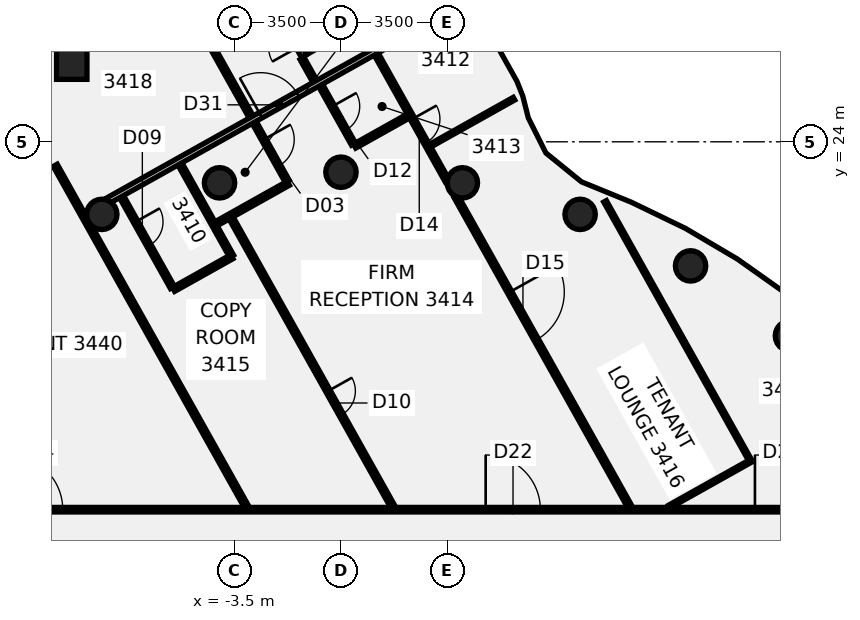
"""IFC4 building model, lengths in metres.
Left out: names, types, materials, properties, quantities, classifications, styles, units other than length and angle.
Written with IfcOpenShell. Run it as: python <this file> out.ifc"""

import sys

from ifc_helpers import new_model, si_unit, direction, frame, frame_2d, origin, origin_2d, place, context, subcontext, project, spatial, rectangle, circle, extrude, element, fill, save


model = new_model("IFC4")
c1 = context("Model", 3, precision=1e-05, world=origin(), true_north=direction((0.0, 1.0)))
c2 = subcontext(c1, "Body", "Model", "MODEL_VIEW")
j1 = project(units=[si_unit("LENGTHUNIT", "METRE"), si_unit("PLANEANGLEUNIT", "RADIAN")], contexts=[c1])
p1 = place(None, origin())
s1 = spatial("IfcSite", under=j1, at=p1, CompositionType="ELEMENT")
p2 = place(p1, origin())
s2 = spatial("IfcBuilding", under=s1, at=p2, CompositionType="ELEMENT")
p3 = place(p2, frame((0.0, 0.0, 140.5)))
s3 = spatial("IfcBuildingStorey", under=s2, at=p3, CompositionType="ELEMENT", Elevation=140.5)
for number, where, z_axis, x_axis in (
    (1, (14.784, 17.619, -0.14), (0.0, 0.0, 1.0), (1.0, 0.0, 0.0)),
    (2, (11.5, 19.919, -0.14), (0.0, 0.0, 1.0), (1.0, 0.0, 0.0)),
    (3, (7.866, 21.613, -0.14), (0.0, 0.0, 1.0), (1.0, 0.0, 0.0)),
    (4, (3.994, 22.651, -0.14), (0.0, 0.0, 1.0), (1.0, 0.0, 0.0)),
    (5, (0.0, 23.0, -0.14), (0.0, 0.0, 1.0), (1.0, 0.0, 0.0)),
    (6, (-3.994, 22.651, -0.14), (0.0, 0.0, 1.0), (1.0, 0.0, 0.0)),
    (7, (-7.866, 21.613, -0.14), (0.0, 0.0, 1.0), (1.0, 0.0, 0.0)),
):
    element("IfcColumn", number, at=place(p3, frame(where, z_axis=z_axis, x_axis=x_axis)), inside=s3, PredefinedType="COLUMN", context=c2, shape_type="SweptSolid", body=[
        extrude(circle(Radius=0.5, at=origin_2d()), origin(), (0.0, 0.0, 1.0), 3.75),
    ])
p4 = place(p3, frame((-8.855, 26.553, -0.139), z_axis=(-0.02173490651, -0.043209514738, 0.998829580897), x_axis=(0.872109852448, 0.487666364721, 0.040073956407)))
e8 = element("IfcColumn", 8, at=p4, inside=s3, PredefinedType="COLUMN", context=c2, shape_type="SweptSolid", body=[
    extrude(rectangle(XDim=1.0, YDim=1.0, at=origin_2d()), origin(), (0.0, 0.0, 1.0), 3.752),
])
p5 = place(p3, frame((-11.663, 40.368, 0.0), z_axis=(0.0, 0.0, 1.0), x_axis=(0.488668731848, -0.8724694095, 0.0)))
e9 = element("IfcWall", 9, at=p5, inside=s3, PredefinedType="PARTITIONING", context=c2, shape_type="SweptSolid", body=[
    extrude(rectangle(XDim=20.245, YDim=0.15, at=frame_2d((10.123, 0.0))), origin(), (0.0, 0.0, 1.0), 3.01),
])
p6 = place(p5, frame((18.675, 0.0, 0.0)))
e10 = element("IfcOpeningElement", 10, at=p6, cuts=e9, PredefinedType="OPENING", context=c2, shape_type="SweptSolid", body=[
    extrude(rectangle(XDim=1.0, YDim=2.1, at=frame_2d((0.5, 1.05))), frame((0.0, 0.085, 0.0), z_axis=(0.0, -1.0, 0.0), x_axis=(1.0, 0.0, 0.0)), (0.0, 0.0, 1.0), 0.17),
])
p7 = place(p5, frame((11.775, 0.0, 0.0)))
e11 = element("IfcOpeningElement", 11, at=p7, cuts=e9, PredefinedType="OPENING", context=c2, shape_type="SweptSolid", body=[
    extrude(rectangle(XDim=0.9, YDim=2.1, at=frame_2d((0.45, 1.05))), frame((0.0, 0.085, 0.0), z_axis=(0.0, -1.0, 0.0), x_axis=(1.0, 0.0, 0.0)), (0.0, 0.0, 1.0), 0.17),
])
p8 = place(p5, frame((5.175, 0.0, 0.0)))
e12 = element("IfcOpeningElement", 12, at=p8, cuts=e9, PredefinedType="OPENING", context=c2, shape_type="SweptSolid", body=[
    extrude(rectangle(XDim=0.9, YDim=2.1, at=frame_2d((0.45, 1.05))), frame((0.0, 0.085, 0.0), z_axis=(0.0, -1.0, 0.0), x_axis=(1.0, 0.0, 0.0)), (0.0, 0.0, 1.0), 0.17),
])
p9 = place(p3, frame((-1.279, 26.739, 0.0), z_axis=(0.0, 0.0, 1.0), x_axis=(0.488655274627, -0.872476946732, 0.0)))
e13 = element("IfcWall", 13, at=p9, inside=s3, PredefinedType="PARTITIONING", context=c2, shape_type="SweptSolid", body=[
    extrude(rectangle(XDim=0.859, YDim=0.15, at=frame_2d((0.43, 0.0))), origin(), (0.0, 0.0, 1.0), 3.01),
])
p10 = place(p3, frame((-9.398, 23.227, 0.0), z_axis=(0.0, 0.0, 1.0), x_axis=(0.488675560633, -0.872465584674, 0.0)))
e14 = element("IfcWall", 14, at=p10, inside=s3, PredefinedType="PARTITIONING", context=c2, shape_type="SweptSolid", body=[
    extrude(rectangle(XDim=12.872, YDim=0.15, at=frame_2d((6.436, 0.0))), origin(), (0.0, 0.0, 1.0), 3.01),
])
p11 = place(p3, frame((-7.217, 22.198, 0.0), z_axis=(0.0, 0.0, 1.0), x_axis=(0.488703240503, -0.872450080361, 0.0)))
e15 = element("IfcWall", 15, at=p11, inside=s3, PredefinedType="PARTITIONING", context=c2, shape_type="SweptSolid", body=[
    extrude(rectangle(XDim=3.424, YDim=0.15, at=frame_2d((1.712, 0.0))), origin(), (0.0, 0.0, 1.0), 3.01),
])
p12 = place(p11, frame((0.95, 0.0, 0.0)))
e16 = element("IfcOpeningElement", 16, at=p12, cuts=e15, PredefinedType="OPENING", context=c2, shape_type="SweptSolid", body=[
    extrude(rectangle(XDim=0.9, YDim=2.1, at=frame_2d((0.45, 1.05))), frame((0.0, 0.085, 0.0), z_axis=(0.0, -1.0, 0.0), x_axis=(1.0, 0.0, 0.0)), (0.0, 0.0, 1.0), 0.17),
])
p13 = place(p3, frame((-5.296, 23.269, 0.0), z_axis=(0.0, 0.0, 1.0), x_axis=(0.488599089901, -0.872508412193, 0.0)))
e17 = element("IfcWall", 17, at=p13, inside=s3, PredefinedType="PARTITIONING", context=c2, shape_type="SweptSolid", body=[
    extrude(rectangle(XDim=3.475, YDim=0.15, at=frame_2d((1.737, 0.0))), origin(), (0.0, 0.0, 1.0), 3.01),
])
p14 = place(p3, frame((-3.614, 21.495, 0.0), z_axis=(0.0, 0.0, 1.0), x_axis=(0.488699647041, -0.87245209323, 0.0)))
e18 = element("IfcWall", 18, at=p14, inside=s3, PredefinedType="PARTITIONING", context=c2, shape_type="SweptSolid", body=[
    extrude(rectangle(XDim=10.887, YDim=0.15, at=frame_2d((5.444, 0.0))), origin(), (0.0, 0.0, 1.0), 3.01),
])
p15 = place(p14, frame((6.525, 0.0, 0.0)))
e19 = element("IfcOpeningElement", 19, at=p15, cuts=e18, PredefinedType="OPENING", context=c2, shape_type="SweptSolid", body=[
    extrude(rectangle(XDim=0.9, YDim=2.1, at=frame_2d((0.45, 1.05))), frame((0.0, 0.085, 0.0), z_axis=(0.0, -1.0, 0.0), x_axis=(1.0, 0.0, 0.0)), (0.0, 0.0, 1.0), 0.17),
])
p16 = place(p3, frame((-0.672, 25.859, 0.0), z_axis=(0.0, 0.0, 1.0), x_axis=(0.488690625144, -0.872457146739, 0.0)))
e20 = element("IfcWall", 20, at=p16, inside=s3, PredefinedType="PARTITIONING", context=c2, shape_type="SweptSolid", body=[
    extrude(rectangle(XDim=2.215, YDim=0.15, at=frame_2d((1.107, 0.0))), origin(), (0.0, 0.0, 1.0), 3.01),
])
p17 = place(p16, frame((0.795, 0.0, 0.0)))
e21 = element("IfcOpeningElement", 21, at=p17, cuts=e20, PredefinedType="OPENING", context=c2, shape_type="SweptSolid", body=[
    extrude(rectangle(XDim=0.9, YDim=2.1, at=frame_2d((0.45, 1.05))), frame((0.0, 0.085, 0.0), z_axis=(0.0, -1.0, 0.0), x_axis=(1.0, 0.0, 0.0)), (0.0, 0.0, 1.0), 0.17),
])
p18 = place(p3, frame((1.16, 26.885, 0.0), z_axis=(0.0, 0.0, 1.0), x_axis=(0.488667044678, -0.872470354479, 0.0)))
e22 = element("IfcWall", 22, at=p18, inside=s3, PredefinedType="PARTITIONING", context=c2, shape_type="SweptSolid", body=[
    extrude(rectangle(XDim=4.787, YDim=0.15, at=frame_2d((2.393, 0.0))), origin(), (0.0, 0.0, 1.0), 3.01),
])
p19 = place(p18, frame((2.445, 0.0, 0.0)))
e23 = element("IfcOpeningElement", 23, at=p19, cuts=e22, PredefinedType="OPENING", context=c2, shape_type="SweptSolid", body=[
    extrude(rectangle(XDim=0.9, YDim=2.1, at=frame_2d((0.45, 1.05))), frame((0.0, 0.085, 0.0), z_axis=(0.0, -1.0, 0.0), x_axis=(1.0, 0.0, 0.0)), (0.0, 0.0, 1.0), 0.17),
])
p20 = place(p3, frame((3.787, 22.196, 0.0), z_axis=(0.0, 0.0, 1.0), x_axis=(0.488718412152, -0.872441581783, 0.0)))
e24 = element("IfcWall", 24, at=p20, inside=s3, PredefinedType="PARTITIONING", context=c2, shape_type="SweptSolid", body=[
    extrude(rectangle(XDim=11.696, YDim=0.15, at=frame_2d((5.848, 0.0))), origin(), (0.0, 0.0, 1.0), 3.01),
])
p21 = place(p20, frame((3.6, 0.0, 0.0)))
e25 = element("IfcOpeningElement", 25, at=p21, cuts=e24, PredefinedType="OPENING", context=c2, shape_type="SweptSolid", body=[
    extrude(rectangle(XDim=1.8, YDim=2.1, at=frame_2d((0.9, 1.05))), frame((0.0, 0.085, 0.0), z_axis=(0.0, -1.0, 0.0), x_axis=(1.0, 0.0, 0.0)), (0.0, 0.0, 1.0), 0.17),
])
p22 = place(p3, frame((8.687, 22.042, 0.0), z_axis=(0.0, 0.0, 1.0), x_axis=(0.488719378488, -0.872441040467, 0.0)))
e26 = element("IfcWall", 26, at=p22, inside=s3, PredefinedType="PARTITIONING", context=c2, shape_type="SweptSolid", body=[
    extrude(rectangle(XDim=9.74, YDim=0.1, at=frame_2d((4.87, 0.0))), origin(), (0.0, 0.0, 1.0), 3.01),
])
p23 = place(p3, frame((-17.065, 11.9, 0.0), z_axis=(0.0, 0.0, 1.0), x_axis=(1.0, 0.0, 0.0)))
e27 = element("IfcWall", 27, at=p23, inside=s3, PredefinedType="PARTITIONING", context=c2, shape_type="SweptSolid", body=[
    extrude(rectangle(XDim=34.165, YDim=0.15, at=frame_2d((17.083, 0.0))), origin(), (0.0, 0.0, 1.0), 3.01),
])
p24 = place(p23, frame((21.825, 0.0, 0.0)))
e28 = element("IfcOpeningElement", 28, at=p24, cuts=e27, PredefinedType="OPENING", context=c2, shape_type="SweptSolid", body=[
    extrude(rectangle(XDim=1.8, YDim=2.1, at=frame_2d((0.9, 1.05))), frame((0.0, 0.085, 0.0), z_axis=(0.0, -1.0, 0.0), x_axis=(1.0, 0.0, 0.0)), (0.0, 0.0, 1.0), 0.17),
])
p25 = place(p23, frame((30.682, 0.0, 0.0)))
e29 = element("IfcOpeningElement", 29, at=p25, cuts=e27, PredefinedType="OPENING", context=c2, shape_type="SweptSolid", body=[
    extrude(rectangle(XDim=1.8, YDim=2.1, at=frame_2d((0.9, 1.05))), frame((0.0, 0.085, 0.0), z_axis=(0.0, -1.0, 0.0), x_axis=(1.0, 0.0, 0.0)), (0.0, 0.0, 1.0), 0.17),
])
p26 = place(p23, frame((6.115, 0.0, 0.0)))
e30 = element("IfcOpeningElement", 30, at=p26, cuts=e27, PredefinedType="OPENING", context=c2, shape_type="SweptSolid", body=[
    extrude(rectangle(XDim=1.8, YDim=2.1, at=frame_2d((0.9, 1.05))), frame((0.0, 0.085, 0.0), z_axis=(0.0, -1.0, 0.0), x_axis=(1.0, 0.0, 0.0)), (0.0, 0.0, 1.0), 0.17),
])
p27 = place(p3, frame((-7.875, 21.945, 0.0), z_axis=(0.0, 0.0, 1.0), x_axis=(0.872611328479, 0.488415263286, 0.0)))
e31 = element("IfcWall", 31, at=p27, inside=s3, PredefinedType="PARTITIONING", context=c2, shape_type="SweptSolid", body=[
    extrude(rectangle(XDim=13.596, YDim=0.2, at=frame_2d((6.798, 0.0))), origin(), (0.0, 0.0, 1.0), 3.01),
])
p28 = place(p27, frame((5.997, 0.0, 0.0)))
e32 = element("IfcOpeningElement", 32, at=p28, cuts=e31, PredefinedType="OPENING", context=c2, shape_type="SweptSolid", body=[
    extrude(rectangle(XDim=1.4, YDim=2.1, at=frame_2d((0.7, 1.05))), frame((0.0, 0.11, 0.0), z_axis=(0.0, -1.0, 0.0), x_axis=(1.0, 0.0, 0.0)), (0.0, 0.0, 1.0), 0.22),
])
p29 = place(p3, frame((-5.507, 19.145, 0.0), z_axis=(0.0, 0.0, 1.0), x_axis=(0.872466268748, 0.488674339307, 0.0)))
e33 = element("IfcWall", 33, at=p29, inside=s3, PredefinedType="PARTITIONING", context=c2, shape_type="SweptSolid", body=[
    extrude(rectangle(XDim=2.2, YDim=0.15, at=frame_2d((1.1, 0.0))), origin(), (0.0, 0.0, 1.0), 3.01),
])
p30 = place(p3, frame((2.934, 23.874, 0.0), z_axis=(0.0, 0.0, 1.0), x_axis=(0.872446737462, 0.488709208315, 0.0)))
e34 = element("IfcWall", 34, at=p30, inside=s3, PredefinedType="PARTITIONING", context=c2, shape_type="SweptSolid", body=[
    extrude(rectangle(XDim=3.161, YDim=0.1, at=frame_2d((1.58, 0.0))), origin(), (0.0, 0.0, 1.0), 3.01),
])
p31 = place(p3, frame((-4.109, 21.304, 0.0), z_axis=(0.0, 0.0, 1.0), x_axis=(0.872440315034, 0.488720673497, 0.0)))
e35 = element("IfcWall", 35, at=p31, inside=s3, PredefinedType="PARTITIONING", context=c2, shape_type="SweptSolid", body=[
    extrude(rectangle(XDim=2.725, YDim=0.15, at=frame_2d((1.363, 0.0))), origin(), (0.0, 0.0, 1.0), 3.01),
])
p32 = place(p3, frame((0.45, 23.857, 0.0), z_axis=(0.0, 0.0, 1.0), x_axis=(0.872462835534, 0.488680468825, 0.0)))
e36 = element("IfcWall", 36, at=p32, inside=s3, PredefinedType="PARTITIONING", context=c2, shape_type="SweptSolid", body=[
    extrude(rectangle(XDim=2.025, YDim=0.15, at=frame_2d((1.012, 0.0))), origin(), (0.0, 0.0, 1.0), 3.01),
])
p33 = place(p3, frame((10.796, 12.0, 0.0), z_axis=(0.0, 0.0, 1.0), x_axis=(0.872341753977, 0.488896578294, 0.0)))
e37 = element("IfcWall", 37, at=p33, inside=s3, PredefinedType="PARTITIONING", context=c2, shape_type="SweptSolid", body=[
    extrude(rectangle(XDim=3.068, YDim=0.1, at=frame_2d((1.534, 0.0))), origin(), (0.0, 0.0, 1.0), 3.01),
])
p34 = place(p3, frame((-1.211, 26.823, -0.14), z_axis=(0.0, 0.0, 1.0), x_axis=(-0.488668831527, 0.872469353671, 0.0)))
e38 = element("IfcWall", 38, at=p34, inside=s3, PredefinedType="SHEAR", context=c2, shape_type="SweptSolid", body=[
    extrude(rectangle(XDim=6.7, YDim=0.2, at=frame_2d((3.35, 0.0))), origin(), (0.0, 0.0, 1.0), 3.15),
])
p35 = place(p34, frame((0.35, 0.0, 0.0)))
e39 = element("IfcOpeningElement", 39, at=p35, cuts=e38, PredefinedType="OPENING", context=c2, shape_type="SweptSolid", body=[
    extrude(rectangle(XDim=1.0, YDim=2.1, at=frame_2d((0.5, 1.05))), frame((0.0, 0.11, 0.0), z_axis=(0.0, -1.0, 0.0), x_axis=(1.0, 0.0, 0.0)), (0.0, 0.0, 1.0), 0.22),
])
p36 = place(p3, frame((1.619, 28.523, -0.14), z_axis=(0.0, 0.0, 1.0), x_axis=(-0.87246047536, -0.488684682526, 0.0)))
e40 = element("IfcWall", 40, at=p36, inside=s3, PredefinedType="SHEAR", context=c2, shape_type="SweptSolid", body=[
    extrude(rectangle(XDim=3.2, YDim=0.2, at=frame_2d((1.6, 0.0))), origin(), (0.0, 0.0, 1.0), 3.15),
])
p37 = place(p6, frame((1.0, 0.0, 0.0), z_axis=(0.0, 0.0, 1.0), x_axis=(-1.0, 0.0, 0.0)))
e41 = element("IfcDoor", 41, at=p37, inside=s3, OperationType="SINGLE_SWING_RIGHT", PredefinedType="DOOR", context=c2, shape_type="SweptSolid", body=[
    extrude(rectangle(XDim=1.0, YDim=2.1, at=frame_2d((0.5, 1.05))), frame((0.0, 0.025, 0.0), z_axis=(0.0, -1.0, 0.0), x_axis=(1.0, 0.0, 0.0)), (0.0, 0.0, 1.0), 0.05),
])
fill(e10, e41)
p38 = place(p12, origin())
e42 = element("IfcDoor", 42, at=p38, inside=s3, OperationType="SINGLE_SWING_RIGHT", PredefinedType="DOOR", context=c2, shape_type="SweptSolid", body=[
    extrude(rectangle(XDim=0.9, YDim=2.1, at=frame_2d((0.45, 1.05))), frame((0.0, 0.025, 0.0), z_axis=(0.0, -1.0, 0.0), x_axis=(1.0, 0.0, 0.0)), (0.0, 0.0, 1.0), 0.05),
])
fill(e16, e42)
p39 = place(p15, frame((0.9, 0.0, 0.0), z_axis=(0.0, 0.0, 1.0), x_axis=(-1.0, 0.0, 0.0)))
e43 = element("IfcDoor", 43, at=p39, inside=s3, OperationType="SINGLE_SWING_RIGHT", PredefinedType="DOOR", context=c2, shape_type="SweptSolid", body=[
    extrude(rectangle(XDim=0.9, YDim=2.1, at=frame_2d((0.45, 1.05))), frame((0.0, 0.025, 0.0), z_axis=(0.0, -1.0, 0.0), x_axis=(1.0, 0.0, 0.0)), (0.0, 0.0, 1.0), 0.05),
])
fill(e19, e43)
p40 = place(p17, origin())
e44 = element("IfcDoor", 44, at=p40, inside=s3, OperationType="SINGLE_SWING_LEFT", PredefinedType="DOOR", context=c2, shape_type="SweptSolid", body=[
    extrude(rectangle(XDim=0.9, YDim=2.1, at=frame_2d((0.45, 1.05))), frame((0.0, 0.025, 0.0), z_axis=(0.0, -1.0, 0.0), x_axis=(1.0, 0.0, 0.0)), (0.0, 0.0, 1.0), 0.05),
])
fill(e21, e44)
p41 = place(p19, origin())
e45 = element("IfcDoor", 45, at=p41, inside=s3, OperationType="SINGLE_SWING_LEFT", PredefinedType="DOOR", context=c2, shape_type="SweptSolid", body=[
    extrude(rectangle(XDim=0.9, YDim=2.1, at=frame_2d((0.45, 1.05))), frame((0.0, 0.025, 0.0), z_axis=(0.0, -1.0, 0.0), x_axis=(1.0, 0.0, 0.0)), (0.0, 0.0, 1.0), 0.05),
])
fill(e23, e45)
p42 = place(p21, origin())
e46 = element("IfcDoor", 46, at=p42, inside=s3, OperationType="DOUBLE_DOOR_SINGLE_SWING", PredefinedType="DOOR", context=c2, shape_type="SweptSolid", body=[
    extrude(rectangle(XDim=1.8, YDim=2.1, at=frame_2d((0.9, 1.05))), frame((0.0, 0.025, 0.0), z_axis=(0.0, -1.0, 0.0), x_axis=(1.0, 0.0, 0.0)), (0.0, 0.0, 1.0), 0.05),
])
fill(e25, e46)
p43 = place(p24, frame((1.8, 0.0, 0.0), z_axis=(0.0, 0.0, 1.0), x_axis=(-1.0, 0.0, 0.0)))
e47 = element("IfcDoor", 47, at=p43, inside=s3, OperationType="DOUBLE_DOOR_SINGLE_SWING", PredefinedType="DOOR", context=c2, shape_type="SweptSolid", body=[
    extrude(rectangle(XDim=1.8, YDim=2.1, at=frame_2d((0.9, 1.05))), frame((0.0, 0.025, 0.0), z_axis=(0.0, -1.0, 0.0), x_axis=(1.0, 0.0, 0.0)), (0.0, 0.0, 1.0), 0.05),
])
fill(e28, e47)
p44 = place(p25, origin())
e48 = element("IfcDoor", 48, at=p44, inside=s3, OperationType="DOUBLE_DOOR_SINGLE_SWING", PredefinedType="DOOR", context=c2, shape_type="SweptSolid", body=[
    extrude(rectangle(XDim=1.8, YDim=2.1, at=frame_2d((0.9, 1.05))), frame((0.0, 0.025, 0.0), z_axis=(0.0, -1.0, 0.0), x_axis=(1.0, 0.0, 0.0)), (0.0, 0.0, 1.0), 0.05),
])
fill(e29, e48)
p45 = place(p26, frame((1.8, 0.0, 0.0), z_axis=(0.0, 0.0, 1.0), x_axis=(-1.0, 0.0, 0.0)))
e49 = element("IfcDoor", 49, at=p45, inside=s3, OperationType="DOUBLE_DOOR_SINGLE_SWING", PredefinedType="DOOR", context=c2, shape_type="SweptSolid", body=[
    extrude(rectangle(XDim=1.8, YDim=2.1, at=frame_2d((0.9, 1.05))), frame((0.0, 0.025, 0.0), z_axis=(0.0, -1.0, 0.0), x_axis=(1.0, 0.0, 0.0)), (0.0, 0.0, 1.0), 0.05),
])
fill(e30, e49)
p46 = place(p28, frame((1.4, 0.0, 0.0), z_axis=(0.0, 0.0, 1.0), x_axis=(-1.0, 0.0, 0.0)))
e50 = element("IfcDoor", 50, at=p46, inside=s3, OperationType="DOUBLE_DOOR_SINGLE_SWING", PredefinedType="DOOR", context=c2, shape_type="SweptSolid", body=[
    extrude(rectangle(XDim=1.4, YDim=2.1, at=frame_2d((0.7, 1.05))), frame((0.0, 0.025, 0.0), z_axis=(0.0, -1.0, 0.0), x_axis=(1.0, 0.0, 0.0)), (0.0, 0.0, 1.0), 0.05),
])
fill(e32, e50)
save(model, sys.argv[1])
